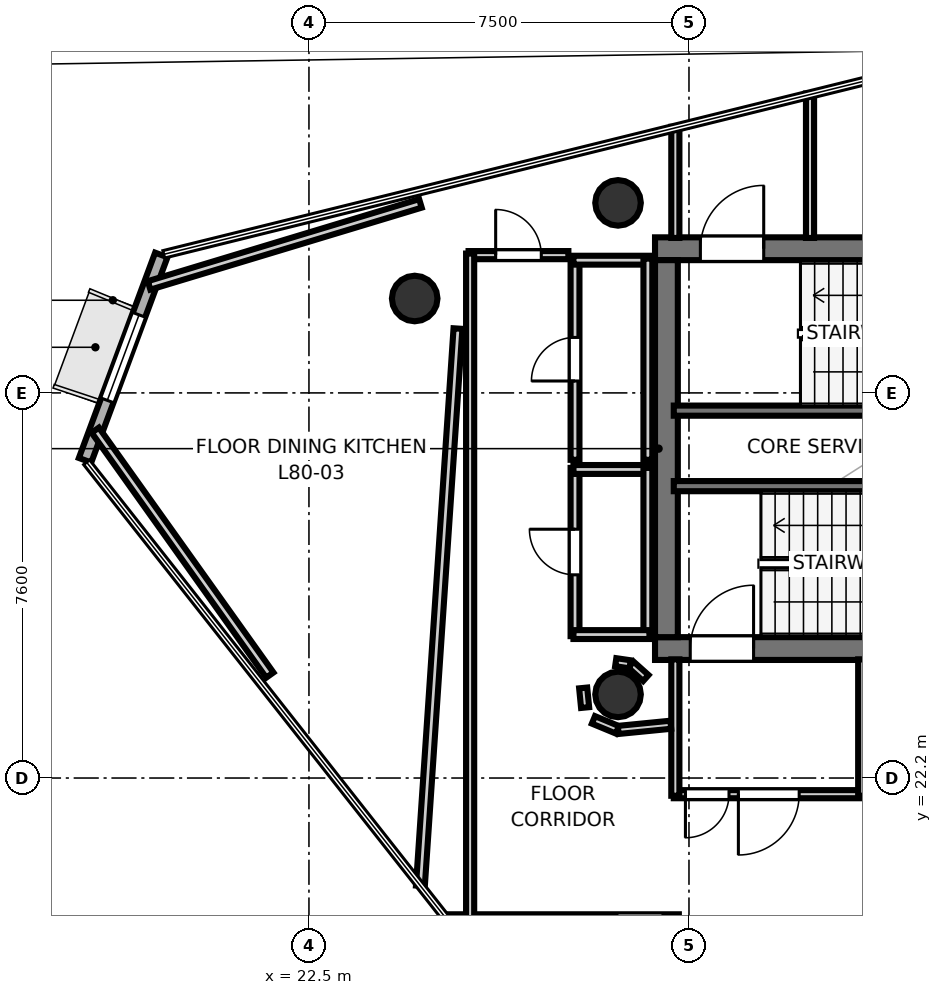
"""IFC4 building model, lengths in metres.
Left out: names, types, materials, properties, quantities, classifications, styles, units other than length and angle.
Written with IfcOpenShell. Run it as: python <this file> out.ifc"""

import sys

from ifc_helpers import new_model, si_unit, direction, frame, frame_2d, origin, origin_2d, place, context, subcontext, project, spatial, rectangle, hollow_circle, extrude, element, fill, save


model = new_model("IFC4")
c1 = context("Model", 3, precision=1e-05, world=origin(), true_north=direction((0.0, 1.0)))
c2 = subcontext(c1, "Body", "Model", "MODEL_VIEW")
j1 = project(units=[si_unit("LENGTHUNIT", "METRE"), si_unit("PLANEANGLEUNIT", "RADIAN")], contexts=[c1])
p1 = place(None, origin())
s1 = spatial("IfcSite", under=j1, at=p1, CompositionType="ELEMENT")
p2 = place(p1, origin())
s2 = spatial("IfcBuilding", under=s1, at=p2, CompositionType="ELEMENT")
p3 = place(p2, frame((0.0, 0.0, 310.2)))
s3 = spatial("IfcBuildingStorey", under=s2, at=p3, CompositionType="ELEMENT", Elevation=310.2)
p4 = place(p3, frame((29.33, 32.645, 0.0), z_axis=(0.0, 0.0, 1.0), x_axis=(1.0, 0.0, 0.0)))
e1 = element("IfcWall", 1, at=p4, inside=s3, PredefinedType="SHEAR", context=c2, shape_type="SweptSolid", body=[
    extrude(rectangle(XDim=10.52, YDim=0.45, at=frame_2d((5.26, 0.0))), origin(), (0.0, 0.0, 1.0), 3.52),
])
p5 = place(p4, frame((0.895, 0.0, 0.0)))
e2 = element("IfcOpeningElement", 2, at=p5, cuts=e1, PredefinedType="OPENING", context=c2, shape_type="SweptSolid", body=[
    extrude(rectangle(XDim=1.25, YDim=2.15, at=frame_2d((0.625, 1.075))), frame((0.0, 0.235, 0.0), z_axis=(0.0, -1.0, 0.0), x_axis=(1.0, 0.0, 0.0)), (0.0, 0.0, 1.0), 0.47),
])
p6 = place(p3, frame((29.33, 24.755, 0.0), z_axis=(0.0, 0.0, 1.0), x_axis=(1.0, 0.0, 0.0)))
e3 = element("IfcWall", 3, at=p6, inside=s3, PredefinedType="SHEAR", context=c2, shape_type="SweptSolid", body=[
    extrude(rectangle(XDim=10.52, YDim=0.45, at=frame_2d((5.26, 0.0))), origin(), (0.0, 0.0, 1.0), 3.52),
])
p7 = place(p6, frame((0.695, 0.0, 0.0)))
e4 = element("IfcOpeningElement", 4, at=p7, cuts=e3, PredefinedType="OPENING", context=c2, shape_type="SweptSolid", body=[
    extrude(rectangle(XDim=1.25, YDim=2.15, at=frame_2d((0.625, 1.075))), frame((0.0, 0.235, 0.0), z_axis=(0.0, -1.0, 0.0), x_axis=(1.0, 0.0, 0.0)), (0.0, 0.0, 1.0), 0.47),
])
p8 = place(p3, frame((29.555, 24.98, 0.0), z_axis=(0.0, 0.0, 1.0), x_axis=(0.0, 1.0, 0.0)))
e5 = element("IfcWall", 5, at=p8, inside=s3, PredefinedType="SHEAR", context=c2, shape_type="SweptSolid", body=[
    extrude(rectangle(XDim=7.44, YDim=0.45, at=frame_2d((3.72, 0.0))), origin(), (0.0, 0.0, 1.0), 3.52),
])
for number, where, z_axis, x_axis in (
    (6, (28.6, 33.55, 0.0), (0.0, 0.0, 1.0), (1.0, 0.0, 0.0)),
    (7, (28.6, 23.85, 0.0), (0.0, 0.0, 1.0), (1.0, 0.0, 0.0)),
    (8, (24.587, 31.663, 0.0), (0.0, 0.0, 1.0), (1.0, 0.0, 0.0)),
):
    element("IfcColumn", number, at=place(p3, frame(where, z_axis=z_axis, x_axis=x_axis)), inside=s3, PredefinedType="COLUMN", context=c2, shape_type="SweptSolid", body=[
        extrude(hollow_circle(Radius=0.45, WallThickness=0.025, at=origin_2d()), origin(), (0.0, 0.0, 1.0), 3.7),
    ])
p9 = place(p3, frame((19.586, 32.522, 0.0), z_axis=(0.0, 0.0, 1.0), x_axis=(-0.34812554465, -0.937447921307, 0.0)))
e9 = element("IfcWall", 9, at=p9, inside=s3, PredefinedType="SOLIDWALL", context=c2, shape_type="SweptSolid", body=[
    extrude(rectangle(XDim=4.322, YDim=0.26, at=frame_2d((2.161, 0.0))), origin(), (0.0, 0.0, 1.0), 3.52),
])
p10 = place(p9, frame((1.261, 0.0, 0.85)))
e10 = element("IfcOpeningElement", 10, at=p10, cuts=e9, PredefinedType="OPENING", context=c2, shape_type="SweptSolid", body=[
    extrude(rectangle(XDim=1.8, YDim=2.1, at=frame_2d((0.9, 1.05))), frame((0.0, 0.14, 0.0), z_axis=(0.0, -1.0, 0.0), x_axis=(1.0, 0.0, 0.0)), (0.0, 0.0, 1.0), 0.28),
])
p11 = place(p3, frame((29.7, 29.45, 0.0), z_axis=(0.0, 0.0, 1.0), x_axis=(1.0, 0.0, 0.0)))
e11 = element("IfcWall", 11, at=p11, inside=s3, PredefinedType="SOLIDWALL", context=c2, shape_type="SweptSolid", body=[
    extrude(rectangle(XDim=8.3, YDim=0.2, at=frame_2d((4.15, 0.0))), origin(), (0.0, 0.0, 1.0), 3.52),
])
p12 = place(p3, frame((29.7, 27.96, 0.0), z_axis=(0.0, 0.0, 1.0), x_axis=(1.0, 0.0, 0.0)))
e12 = element("IfcWall", 12, at=p12, inside=s3, PredefinedType="SOLIDWALL", context=c2, shape_type="SweptSolid", body=[
    extrude(rectangle(XDim=7.75, YDim=0.2, at=frame_2d((3.875, 0.0))), origin(), (0.0, 0.0, 1.0), 3.52),
])
p13 = place(p3, frame((29.731, 32.858, 0.0), z_axis=(0.0, 0.0, 1.0), x_axis=(0.0, 1.0, 0.0)))
e13 = element("IfcWall", 13, at=p13, inside=s3, PredefinedType="PARTITIONING", context=c2, shape_type="SweptSolid", body=[
    extrude(rectangle(XDim=2.193, YDim=0.16, at=frame_2d((1.096, 0.0))), origin(), (0.0, 0.0, 1.0), 2.84),
])
p14 = place(p3, frame((32.389, 35.708, 0.0), z_axis=(0.0, 0.0, 1.0), x_axis=(0.0, -1.0, 0.0)))
e14 = element("IfcWall", 14, at=p14, inside=s3, PredefinedType="PARTITIONING", context=c2, shape_type="SweptSolid", body=[
    extrude(rectangle(XDim=2.85, YDim=0.16, at=frame_2d((1.425, 0.0))), origin(), (0.0, 0.0, 1.0), 2.84),
])
p15 = place(p3, frame((33.45, 21.881, 0.0), z_axis=(0.0, 0.0, 1.0), x_axis=(-1.0, 0.0, 0.0)))
e15 = element("IfcWall", 15, at=p15, inside=s3, PredefinedType="PARTITIONING", context=c2, shape_type="SweptSolid", body=[
    extrude(rectangle(XDim=3.75, YDim=0.16, at=frame_2d((1.875, 0.0))), origin(), (0.0, 0.0, 1.0), 2.84),
])
p16 = place(p15, frame((1.275, 0.0, 0.0)))
e16 = element("IfcOpeningElement", 16, at=p16, cuts=e15, PredefinedType="OPENING", context=c2, shape_type="SweptSolid", body=[
    extrude(rectangle(XDim=1.2, YDim=2.15, at=frame_2d((0.6, 1.075))), frame((0.0, 0.09, 0.0), z_axis=(0.0, -1.0, 0.0), x_axis=(1.0, 0.0, 0.0)), (0.0, 0.0, 1.0), 0.18),
])
p17 = place(p15, frame((2.66, 0.0, 0.0)))
e17 = element("IfcOpeningElement", 17, at=p17, cuts=e15, PredefinedType="OPENING", context=c2, shape_type="SweptSolid", body=[
    extrude(rectangle(XDim=0.86, YDim=2.05, at=frame_2d((0.43, 1.025))), frame((0.0, 0.09, 0.0), z_axis=(0.0, -1.0, 0.0), x_axis=(1.0, 0.0, 0.0)), (0.0, 0.0, 1.0), 0.18),
])
for number, where, z_axis, x_axis in (
    (18, (29.731, 21.85, 0.0), (0.0, 0.0, 1.0), (0.0, 1.0, 0.0)),
    (19, (33.419, 24.542, 0.0), (0.0, 0.0, 1.0), (0.0, -1.0, 0.0)),
):
    element("IfcWall", number, at=place(p3, frame(where, z_axis=z_axis, x_axis=x_axis)), inside=s3, PredefinedType="PARTITIONING", context=c2, shape_type="SweptSolid", body=[
        extrude(rectangle(XDim=2.692, YDim=0.16, at=frame_2d((1.346, 0.0))), origin(), (0.0, 0.0, 1.0), 2.84),
    ])
p18 = place(p3, frame((27.751, 25.0, 0.0), z_axis=(0.0, 0.0, 1.0), x_axis=(0.0, 1.0, 0.0)))
e20 = element("IfcWall", 20, at=p18, inside=s3, PredefinedType="PLUMBINGWALL", context=c2, shape_type="SweptSolid", body=[
    extrude(rectangle(XDim=3.32, YDim=0.175, at=frame_2d((1.66, 0.0))), origin(), (0.0, 0.0, 1.0), 2.84),
])
p19 = place(p18, frame((1.21, 0.0, 0.0)))
e21 = element("IfcOpeningElement", 21, at=p19, cuts=e20, PredefinedType="OPENING", context=c2, shape_type="SweptSolid", body=[
    extrude(rectangle(XDim=0.9, YDim=2.1, at=frame_2d((0.45, 1.05))), frame((0.0, 0.097, 0.0), z_axis=(0.0, -1.0, 0.0), x_axis=(1.0, 0.0, 0.0)), (0.0, 0.0, 1.0), 0.195),
])
p20 = place(p3, frame((27.72, 28.289, 0.0), z_axis=(0.0, 0.0, 1.0), x_axis=(1.0, 0.0, 0.0)))
e22 = element("IfcWall", 22, at=p20, inside=s3, PredefinedType="PLUMBINGWALL", context=c2, shape_type="SweptSolid", body=[
    extrude(rectangle(XDim=1.5, YDim=0.175, at=frame_2d((0.75, 0.0))), origin(), (0.0, 0.0, 1.0), 2.84),
])
p21 = place(p3, frame((29.189, 28.32, 0.0), z_axis=(0.0, 0.0, 1.0), x_axis=(0.0, -1.0, 0.0)))
e23 = element("IfcWall", 23, at=p21, inside=s3, PredefinedType="PLUMBINGWALL", context=c2, shape_type="SweptSolid", body=[
    extrude(rectangle(XDim=3.32, YDim=0.175, at=frame_2d((1.66, 0.0))), origin(), (0.0, 0.0, 1.0), 2.84),
])
p22 = place(p3, frame((29.22, 25.031, 0.0), z_axis=(0.0, 0.0, 1.0), x_axis=(-1.0, 0.0, 0.0)))
e24 = element("IfcWall", 24, at=p22, inside=s3, PredefinedType="PLUMBINGWALL", context=c2, shape_type="SweptSolid", body=[
    extrude(rectangle(XDim=1.5, YDim=0.175, at=frame_2d((0.75, 0.0))), origin(), (0.0, 0.0, 1.0), 2.84),
])
p23 = place(p3, frame((27.751, 28.48, 0.0), z_axis=(0.0, 0.0, 1.0), x_axis=(0.0, 1.0, 0.0)))
e25 = element("IfcWall", 25, at=p23, inside=s3, PredefinedType="PLUMBINGWALL", context=c2, shape_type="SweptSolid", body=[
    extrude(rectangle(XDim=3.97, YDim=0.175, at=frame_2d((1.985, 0.0))), origin(), (0.0, 0.0, 1.0), 2.84),
])
p24 = place(p23, frame((1.555, 0.0, 0.0)))
e26 = element("IfcOpeningElement", 26, at=p24, cuts=e25, PredefinedType="OPENING", context=c2, shape_type="SweptSolid", body=[
    extrude(rectangle(XDim=0.86, YDim=2.05, at=frame_2d((0.43, 1.025))), frame((0.0, 0.097, 0.0), z_axis=(0.0, -1.0, 0.0), x_axis=(1.0, 0.0, 0.0)), (0.0, 0.0, 1.0), 0.195),
])
p25 = place(p3, frame((27.72, 32.419, 0.0), z_axis=(0.0, 0.0, 1.0), x_axis=(1.0, 0.0, 0.0)))
e27 = element("IfcWall", 27, at=p25, inside=s3, PredefinedType="PLUMBINGWALL", context=c2, shape_type="SweptSolid", body=[
    extrude(rectangle(XDim=1.5, YDim=0.175, at=frame_2d((0.75, 0.0))), origin(), (0.0, 0.0, 1.0), 2.84),
])
p26 = place(p3, frame((29.189, 32.45, 0.0), z_axis=(0.0, 0.0, 1.0), x_axis=(0.0, -1.0, 0.0)))
e28 = element("IfcWall", 28, at=p26, inside=s3, PredefinedType="PLUMBINGWALL", context=c2, shape_type="SweptSolid", body=[
    extrude(rectangle(XDim=3.97, YDim=0.175, at=frame_2d((1.985, 0.0))), origin(), (0.0, 0.0, 1.0), 2.84),
])
p27 = place(p3, frame((29.149, 24.173, 0.0), z_axis=(0.0, 0.0, 1.0), x_axis=(-0.745225165416, 0.666812906917, 0.0)))
e29 = element("IfcWall", 29, at=p27, inside=s3, PredefinedType="PARTITIONING", context=c2, shape_type="SweptSolid", body=[
    extrude(rectangle(XDim=0.396, YDim=0.16, at=frame_2d((0.198, 0.0))), origin(), (0.0, 0.0, 1.0), 2.84),
])
p28 = place(p3, frame((28.838, 24.444, 0.0), z_axis=(0.0, 0.0, 1.0), x_axis=(-0.989449148305, 0.144880581578, 0.0)))
e30 = element("IfcWall", 30, at=p28, inside=s3, PredefinedType="PARTITIONING", context=c2, shape_type="SweptSolid", body=[
    extrude(rectangle(XDim=0.286, YDim=0.16, at=frame_2d((0.143, 0.0))), origin(), (0.0, 0.0, 1.0), 2.84),
])
p29 = place(p3, frame((25.65, 32.519, 0.0), z_axis=(0.0, 0.0, 1.0), x_axis=(1.0, 0.0, 0.0)))
e31 = element("IfcWall", 31, at=p29, inside=s3, PredefinedType="PARTITIONING", context=c2, shape_type="SweptSolid", body=[
    extrude(rectangle(XDim=1.97, YDim=0.16, at=frame_2d((0.985, 0.0))), origin(), (0.0, 0.0, 1.0), 2.84),
])
p30 = place(p29, frame((0.535, 0.0, 0.0)))
e32 = element("IfcOpeningElement", 32, at=p30, cuts=e31, PredefinedType="OPENING", context=c2, shape_type="SweptSolid", body=[
    extrude(rectangle(XDim=0.9, YDim=2.1, at=frame_2d((0.45, 1.05))), frame((0.0, 0.09, 0.0), z_axis=(0.0, -1.0, 0.0), x_axis=(1.0, 0.0, 0.0)), (0.0, 0.0, 1.0), 0.18),
])
p31 = place(p3, frame((27.912, 23.978, 0.0), z_axis=(0.0, 0.0, 1.0), x_axis=(0.097888269922, -0.995197410875, 0.0)))
e33 = element("IfcWall", 33, at=p31, inside=s3, PredefinedType="PARTITIONING", context=c2, shape_type="SweptSolid", body=[
    extrude(rectangle(XDim=0.389, YDim=0.16, at=frame_2d((0.195, 0.0))), origin(), (0.0, 0.0, 1.0), 2.84),
])
p32 = place(p3, frame((28.115, 23.348, 0.0), z_axis=(0.0, 0.0, 1.0), x_axis=(0.923807847969, -0.382856448334, 0.0)))
e34 = element("IfcWall", 34, at=p32, inside=s3, PredefinedType="PARTITIONING", context=c2, shape_type="SweptSolid", body=[
    extrude(rectangle(XDim=0.513, YDim=0.16, at=frame_2d((0.256, 0.0))), origin(), (0.0, 0.0, 1.0), 2.84),
])
p33 = place(p3, frame((28.603, 23.149, 0.0), z_axis=(0.0, 0.0, 1.0), x_axis=(0.995179827095, 0.098066873836, 0.0)))
e35 = element("IfcWall", 35, at=p33, inside=s3, PredefinedType="PARTITIONING", context=c2, shape_type="SweptSolid", body=[
    extrude(rectangle(XDim=1.043, YDim=0.16, at=frame_2d((0.521, 0.0))), origin(), (0.0, 0.0, 1.0), 2.84),
])
p34 = place(p3, frame((29.8, 19.431, 0.0), z_axis=(0.0, 0.0, 1.0), x_axis=(-1.0, 0.0, 0.0)))
e36 = element("IfcWall", 36, at=p34, inside=s3, PredefinedType="PARTITIONING", context=c2, shape_type="SweptSolid", body=[
    extrude(rectangle(XDim=4.615, YDim=0.16, at=frame_2d((2.307, 0.0))), origin(), (0.0, 0.0, 1.0), 2.84),
])
p35 = place(p34, frame((0.317, 0.0, 0.0)))
e37 = element("IfcOpeningElement", 37, at=p35, cuts=e36, PredefinedType="OPENING", context=c2, shape_type="SweptSolid", body=[
    extrude(rectangle(XDim=0.9, YDim=2.1, at=frame_2d((0.45, 1.05))), frame((0.0, 0.09, 0.0), z_axis=(0.0, -1.0, 0.0), x_axis=(1.0, 0.0, 0.0)), (0.0, 0.0, 1.0), 0.18),
])
p36 = place(p3, frame((25.681, 18.807, 0.0), z_axis=(0.0, 0.0, 1.0), x_axis=(0.0, 1.0, 0.0)))
e38 = element("IfcWall", 38, at=p36, inside=s3, PredefinedType="PARTITIONING", context=c2, shape_type="SweptSolid", body=[
    extrude(rectangle(XDim=13.743, YDim=0.16, at=frame_2d((6.872, 0.0))), origin(), (0.0, 0.0, 1.0), 2.84),
])
p37 = place(p3, frame((25.441, 31.07, 0.0), z_axis=(0.0, 0.0, 1.0), x_axis=(-0.067271723884, -0.997734691772, 0.0)))
e39 = element("IfcWall", 39, at=p37, inside=s3, PredefinedType="PLUMBINGWALL", context=c2, shape_type="SweptSolid", body=[
    extrude(rectangle(XDim=11.022, YDim=0.175, at=frame_2d((5.511, 0.0))), origin(), (0.0, 0.0, 1.0), 2.84),
])
p38 = place(p3, frame((21.728, 24.231, 0.0), z_axis=(0.0, 0.0, 1.0), x_axis=(-0.580366192464, 0.814355624187, 0.0)))
e40 = element("IfcWall", 40, at=p38, inside=s3, PredefinedType="PLUMBINGWALL", context=c2, shape_type="SweptSolid", body=[
    extrude(rectangle(XDim=5.935, YDim=0.175, at=frame_2d((2.967, 0.0))), origin(), (0.0, 0.0, 1.0), 2.84),
])
p39 = place(p3, frame((19.345, 31.921, 0.0), z_axis=(0.0, 0.0, 1.0), x_axis=(0.957238131627, 0.289301156859, 0.0)))
e41 = element("IfcWall", 41, at=p39, inside=s3, PredefinedType="PLUMBINGWALL", context=c2, shape_type="SweptSolid", body=[
    extrude(rectangle(XDim=5.594, YDim=0.175, at=frame_2d((2.797, 0.0))), origin(), (0.0, 0.0, 1.0), 2.84),
])
p40 = place(p5, origin())
e42 = element("IfcDoor", 42, at=p40, inside=s3, OperationType="SINGLE_SWING_RIGHT", PredefinedType="DOOR", context=c2, shape_type="SweptSolid", body=[
    extrude(rectangle(XDim=1.25, YDim=2.15, at=frame_2d((0.625, 1.075))), frame((0.0, 0.025, 0.0), z_axis=(0.0, -1.0, 0.0), x_axis=(1.0, 0.0, 0.0)), (0.0, 0.0, 1.0), 0.05),
])
fill(e2, e42)
p41 = place(p7, origin())
e43 = element("IfcDoor", 43, at=p41, inside=s3, OperationType="SINGLE_SWING_RIGHT", PredefinedType="DOOR", context=c2, shape_type="SweptSolid", body=[
    extrude(rectangle(XDim=1.25, YDim=2.15, at=frame_2d((0.625, 1.075))), frame((0.0, 0.025, 0.0), z_axis=(0.0, -1.0, 0.0), x_axis=(1.0, 0.0, 0.0)), (0.0, 0.0, 1.0), 0.05),
])
fill(e4, e43)
p42 = place(p16, origin())
e44 = element("IfcDoor", 44, at=p42, inside=s3, OperationType="SINGLE_SWING_RIGHT", PredefinedType="DOOR", context=c2, shape_type="SweptSolid", body=[
    extrude(rectangle(XDim=1.2, YDim=2.15, at=frame_2d((0.6, 1.075))), frame((0.0, 0.025, 0.0), z_axis=(0.0, -1.0, 0.0), x_axis=(1.0, 0.0, 0.0)), (0.0, 0.0, 1.0), 0.05),
])
fill(e16, e44)
p43 = place(p19, origin())
e45 = element("IfcDoor", 45, at=p43, inside=s3, OperationType="SINGLE_SWING_RIGHT", PredefinedType="DOOR", context=c2, shape_type="SweptSolid", body=[
    extrude(rectangle(XDim=0.9, YDim=2.1, at=frame_2d((0.45, 1.05))), frame((0.0, 0.025, 0.0), z_axis=(0.0, -1.0, 0.0), x_axis=(1.0, 0.0, 0.0)), (0.0, 0.0, 1.0), 0.05),
])
fill(e21, e45)
p44 = place(p24, origin())
e46 = element("IfcDoor", 46, at=p44, inside=s3, OperationType="SINGLE_SWING_LEFT", PredefinedType="DOOR", context=c2, shape_type="SweptSolid", body=[
    extrude(rectangle(XDim=0.86, YDim=2.05, at=frame_2d((0.43, 1.025))), frame((0.0, 0.025, 0.0), z_axis=(0.0, -1.0, 0.0), x_axis=(1.0, 0.0, 0.0)), (0.0, 0.0, 1.0), 0.05),
])
fill(e26, e46)
p45 = place(p17, origin())
e47 = element("IfcDoor", 47, at=p45, inside=s3, OperationType="SINGLE_SWING_RIGHT", PredefinedType="DOOR", context=c2, shape_type="SweptSolid", body=[
    extrude(rectangle(XDim=0.86, YDim=2.05, at=frame_2d((0.43, 1.025))), frame((0.0, 0.025, 0.0), z_axis=(0.0, -1.0, 0.0), x_axis=(1.0, 0.0, 0.0)), (0.0, 0.0, 1.0), 0.05),
])
fill(e17, e47)
p46 = place(p30, origin())
e48 = element("IfcDoor", 48, at=p46, inside=s3, OperationType="SINGLE_SWING_LEFT", PredefinedType="DOOR", context=c2, shape_type="SweptSolid", body=[
    extrude(rectangle(XDim=0.9, YDim=2.1, at=frame_2d((0.45, 1.05))), frame((0.0, 0.025, 0.0), z_axis=(0.0, -1.0, 0.0), x_axis=(1.0, 0.0, 0.0)), (0.0, 0.0, 1.0), 0.05),
])
fill(e32, e48)
p47 = place(p10, origin())
e49 = element("IfcWindow", 49, at=p47, inside=s3, PartitioningType="SINGLE_PANEL", PredefinedType="WINDOW", context=c2, shape_type="SweptSolid", body=[
    extrude(rectangle(XDim=1.8, YDim=2.1, at=frame_2d((0.9, 1.05))), frame((0.0, 0.03, 0.0), z_axis=(0.0, -1.0, 0.0), x_axis=(1.0, 0.0, 0.0)), (0.0, 0.0, 1.0), 0.06),
])
fill(e10, e49)
save(model, sys.argv[1])
